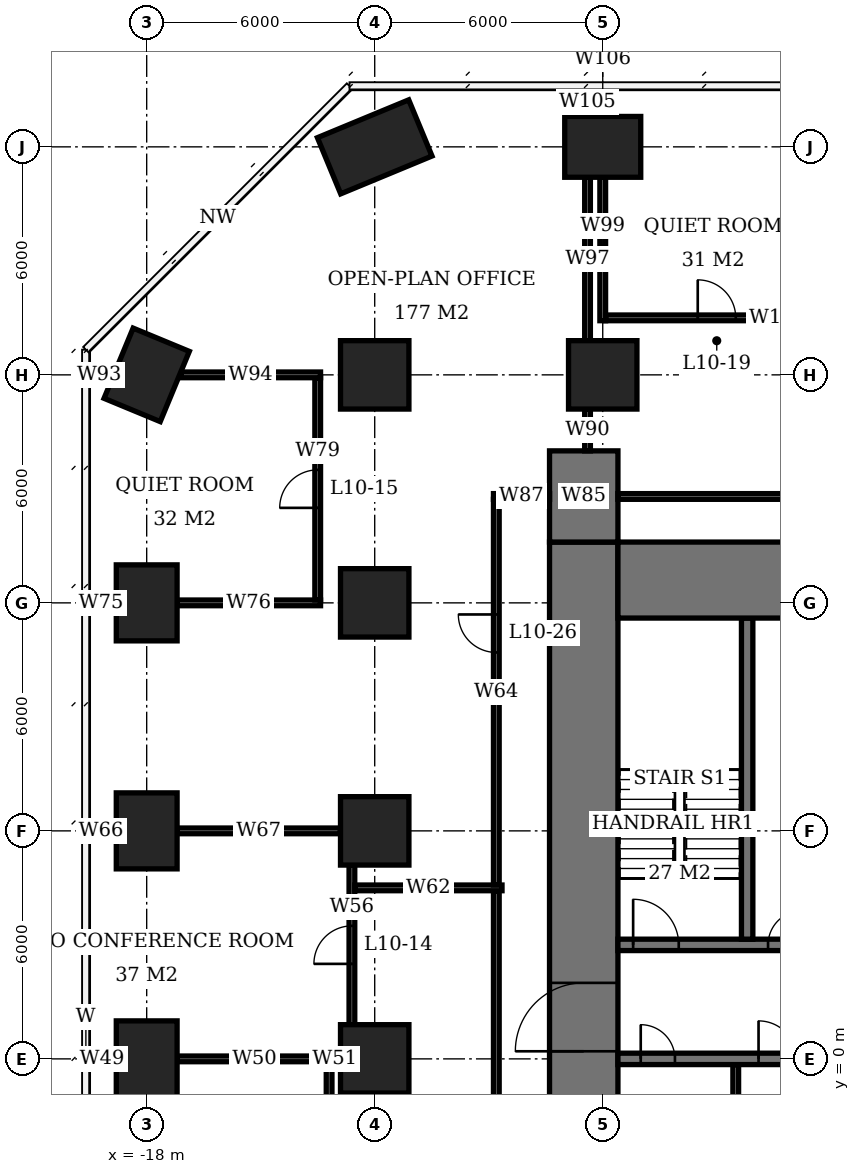
"""IFC4 building model, lengths in metres.
Left out: names, types, materials, properties, quantities, classifications, styles, units other than length and angle.
Written with IfcOpenShell. Run it as: python <this file> out.ifc"""

import sys

from ifc_helpers import new_model, si_unit, direction, frame, frame_2d, origin, origin_2d, place, context, subcontext, project, spatial, rectangle, extrude, element, fill, save


model = new_model("IFC4")
c1 = context("Model", 3, precision=1e-05, world=origin(), true_north=direction((0.0, 1.0)))
c2 = subcontext(c1, "Body", "Model", "MODEL_VIEW")
j1 = project(units=[si_unit("LENGTHUNIT", "METRE"), si_unit("PLANEANGLEUNIT", "RADIAN")], contexts=[c1])
p1 = place(None, origin())
s1 = spatial("IfcSite", under=j1, at=p1, CompositionType="ELEMENT")
p2 = place(p1, origin())
s2 = spatial("IfcBuilding", under=s1, at=p2, CompositionType="ELEMENT")
p3 = place(p2, frame((0.0, 0.0, 45.5)))
s3 = spatial("IfcBuildingStorey", under=s2, at=p3, CompositionType="ELEMENT", Elevation=45.5)
for number, where, z_axis, x_axis in (
    (1, (-18.0, 0.0, 0.0), (0.0, 0.0, 1.0), (0.0, 1.0, 0.0)),
    (2, (-18.0, 6.0, 0.0), (0.0, 0.0, 1.0), (0.0, 1.0, 0.0)),
    (3, (-18.0, 12.0, 0.0), (0.0, 0.0, 1.0), (0.0, 1.0, 0.0)),
    (4, (-18.0, 18.0, 0.0), (0.0, 0.0, 1.0), (0.383, 0.924, 0.0)),
):
    element("IfcColumn", number, at=place(p3, frame(where, z_axis=z_axis, x_axis=x_axis)), inside=s3, PredefinedType="COLUMN", context=c2, shape_type="SweptSolid", body=[
        extrude(rectangle(XDim=2.0, YDim=1.6, at=origin_2d()), origin(), (0.0, 0.0, 1.0), 3.9),
    ])
for number, where, z_axis, x_axis in (
    (5, (-12.0, 0.0, 0.0), (0.0, 0.0, 1.0), (1.0, 0.0, 0.0)),
    (6, (-12.0, 6.0, 0.0), (0.0, 0.0, 1.0), (1.0, 0.0, 0.0)),
    (7, (-12.0, 12.0, 0.0), (0.0, 0.0, 1.0), (1.0, 0.0, 0.0)),
    (8, (-12.0, 18.0, 0.0), (0.0, 0.0, 1.0), (1.0, 0.0, 0.0)),
):
    element("IfcColumn", number, at=place(p3, frame(where, z_axis=z_axis, x_axis=x_axis)), inside=s3, PredefinedType="COLUMN", context=c2, shape_type="SweptSolid", body=[
        extrude(rectangle(XDim=1.8, YDim=1.8, at=origin_2d()), origin(), (0.0, 0.0, 1.0), 3.9),
    ])
p4 = place(p3, frame((-12.0, 24.0, 0.0), z_axis=(0.0, 0.0, 1.0), x_axis=(0.923879532511, 0.382683432365, 0.0)))
e9 = element("IfcColumn", 9, at=p4, inside=s3, PredefinedType="COLUMN", context=c2, shape_type="SweptSolid", body=[
    extrude(rectangle(XDim=2.6, YDim=1.6, at=origin_2d()), origin(), (0.0, 0.0, 1.0), 3.9),
])
p5 = place(p3, frame((-6.0, 18.0, 0.0), z_axis=(0.0, 0.0, 1.0), x_axis=(1.0, 0.0, 0.0)))
e10 = element("IfcColumn", 10, at=p5, inside=s3, PredefinedType="COLUMN", context=c2, shape_type="SweptSolid", body=[
    extrude(rectangle(XDim=1.8, YDim=1.8, at=origin_2d()), origin(), (0.0, 0.0, 1.0), 3.9),
])
p6 = place(p3, frame((-6.0, 24.0, 0.0), z_axis=(0.0, 0.0, 1.0), x_axis=(1.0, 0.0, 0.0)))
e11 = element("IfcColumn", 11, at=p6, inside=s3, PredefinedType="COLUMN", context=c2, shape_type="SweptSolid", body=[
    extrude(rectangle(XDim=2.0, YDim=1.6, at=origin_2d()), origin(), (0.0, 0.0, 1.0), 3.9),
])
p7 = place(p3, frame((-5.6, 12.6, 0.0), z_axis=(0.0, 0.0, 1.0), x_axis=(1.0, 0.0, 0.0)))
e12 = element("IfcWall", 12, at=p7, inside=s3, PredefinedType="SHEAR", context=c2, shape_type="SweptSolid", body=[
    extrude(rectangle(XDim=23.2, YDim=2.0, at=frame_2d((11.6, 0.0))), origin(), (0.0, 0.0, 1.0), 3.9),
])
p8 = place(p3, frame((-6.5, -7.6, 0.0), z_axis=(0.0, 0.0, 1.0), x_axis=(0.0, 1.0, 0.0)))
e13 = element("IfcWall", 13, at=p8, inside=s3, PredefinedType="SHEAR", context=c2, shape_type="SweptSolid", body=[
    extrude(rectangle(XDim=21.2, YDim=1.8, at=frame_2d((10.6, 0.0))), origin(), (0.0, 0.0, 1.0), 3.9),
])
p9 = place(p8, frame((7.8, 0.0, 0.0)))
e14 = element("IfcOpeningElement", 14, at=p9, cuts=e13, PredefinedType="OPENING", context=c2, shape_type="SweptSolid", body=[
    extrude(rectangle(XDim=1.8, YDim=2.4, at=frame_2d((0.9, 1.2))), frame((0.0, 0.91, 0.0), z_axis=(0.0, -1.0, 0.0), x_axis=(1.0, 0.0, 0.0)), (0.0, 0.0, 1.0), 1.82),
])
p10 = place(p3, frame((-6.5, 13.6, 0.0), z_axis=(0.0, 0.0, 1.0), x_axis=(0.0, 1.0, 0.0)))
e15 = element("IfcWall", 15, at=p10, inside=s3, PredefinedType="SHEAR", context=c2, shape_type="SweptSolid", body=[
    extrude(rectangle(XDim=2.4, YDim=1.8, at=frame_2d((1.2, 0.0))), origin(), (0.0, 0.0, 1.0), 3.9),
])
p11 = place(p3, frame((-5.6, 0.0, 0.0), z_axis=(0.0, 0.0, 1.0), x_axis=(1.0, 0.0, 0.0)))
e16 = element("IfcWall", 16, at=p11, inside=s3, PredefinedType="SHEAR", context=c2, shape_type="SweptSolid", body=[
    extrude(rectangle(XDim=17.75, YDim=0.3, at=frame_2d((8.875, 0.0))), origin(), (0.0, 0.0, 1.0), 3.9),
])
p12 = place(p11, frame((0.6, 0.0, 0.0)))
e17 = element("IfcOpeningElement", 17, at=p12, cuts=e16, PredefinedType="OPENING", context=c2, shape_type="SweptSolid", body=[
    extrude(rectangle(XDim=0.9, YDim=2.1, at=frame_2d((0.45, 1.05))), frame((0.0, 0.16, 0.0), z_axis=(0.0, -1.0, 0.0), x_axis=(1.0, 0.0, 0.0)), (0.0, 0.0, 1.0), 0.32),
])
p13 = place(p11, frame((3.7, 0.0, 0.0)))
e18 = element("IfcOpeningElement", 18, at=p13, cuts=e16, PredefinedType="OPENING", context=c2, shape_type="SweptSolid", body=[
    extrude(rectangle(XDim=1.0, YDim=2.1, at=frame_2d((0.5, 1.05))), frame((0.0, 0.16, 0.0), z_axis=(0.0, -1.0, 0.0), x_axis=(1.0, 0.0, 0.0)), (0.0, 0.0, 1.0), 0.32),
])
p14 = place(p3, frame((-5.6, 3.0, 0.0), z_axis=(0.0, 0.0, 1.0), x_axis=(1.0, 0.0, 0.0)))
e19 = element("IfcWall", 19, at=p14, inside=s3, PredefinedType="SHEAR", context=c2, shape_type="SweptSolid", body=[
    extrude(rectangle(XDim=5.45, YDim=0.3, at=frame_2d((2.725, 0.0))), origin(), (0.0, 0.0, 1.0), 3.9),
])
p15 = place(p14, frame((0.4, 0.0, 0.0)))
e20 = element("IfcOpeningElement", 20, at=p15, cuts=e19, PredefinedType="OPENING", context=c2, shape_type="SweptSolid", body=[
    extrude(rectangle(XDim=1.2, YDim=2.1, at=frame_2d((0.6, 1.05))), frame((0.0, 0.16, 0.0), z_axis=(0.0, -1.0, 0.0), x_axis=(1.0, 0.0, 0.0)), (0.0, 0.0, 1.0), 0.32),
])
p16 = place(p14, frame((3.95, 0.0, 0.0)))
e21 = element("IfcOpeningElement", 21, at=p16, cuts=e19, PredefinedType="OPENING", context=c2, shape_type="SweptSolid", body=[
    extrude(rectangle(XDim=0.9, YDim=2.1, at=frame_2d((0.45, 1.05))), frame((0.0, 0.16, 0.0), z_axis=(0.0, -1.0, 0.0), x_axis=(1.0, 0.0, 0.0)), (0.0, 0.0, 1.0), 0.32),
])
p17 = place(p3, frame((-2.2, 3.15, 0.0), z_axis=(0.0, 0.0, 1.0), x_axis=(0.0, 1.0, 0.0)))
e22 = element("IfcWall", 22, at=p17, inside=s3, PredefinedType="SHEAR", context=c2, shape_type="SweptSolid", body=[
    extrude(rectangle(XDim=8.45, YDim=0.3, at=frame_2d((4.225, 0.0))), origin(), (0.0, 0.0, 1.0), 3.9),
])
p18 = place(p3, frame((-2.5, -5.6, 0.0), z_axis=(0.0, 0.0, 1.0), x_axis=(0.0, 1.0, 0.0)))
e23 = element("IfcWall", 23, at=p18, inside=s3, PredefinedType="PLUMBINGWALL", context=c2, shape_type="SweptSolid", body=[
    extrude(rectangle(XDim=5.45, YDim=0.15, at=frame_2d((2.725, 0.0))), origin(), (0.0, 0.0, 1.0), 3.65),
])
p19 = place(p3, frame((-19.55, 0.0, 0.0), z_axis=(0.0, 0.0, 1.0), x_axis=(1.0, 0.0, 0.0)))
e24 = element("IfcWall", 24, at=p19, inside=s3, PredefinedType="PARTITIONING", context=c2, shape_type="SweptSolid", body=[
    extrude(rectangle(XDim=0.75, YDim=0.15, at=frame_2d((0.375, 0.0))), origin(), (0.0, 0.0, 1.0), 3.65),
])
p20 = place(p3, frame((-17.2, 0.0, 0.0), z_axis=(0.0, 0.0, 1.0), x_axis=(1.0, 0.0, 0.0)))
e25 = element("IfcWall", 25, at=p20, inside=s3, PredefinedType="PARTITIONING", context=c2, shape_type="SweptSolid", body=[
    extrude(rectangle(XDim=4.075, YDim=0.15, at=frame_2d((2.038, 0.0))), origin(), (0.0, 0.0, 1.0), 3.65),
])
p21 = place(p3, frame((-13.2, 0.0, 0.0), z_axis=(0.0, 0.0, 1.0), x_axis=(1.0, 0.0, 0.0)))
e26 = element("IfcWall", 26, at=p21, inside=s3, PredefinedType="PARTITIONING", context=c2, shape_type="SweptSolid", body=[
    extrude(rectangle(XDim=0.3, YDim=0.15, at=frame_2d((0.15, 0.0))), origin(), (0.0, 0.0, 1.0), 3.65),
])
p22 = place(p3, frame((-19.6, 6.0, 0.0), z_axis=(0.0, 0.0, 1.0), x_axis=(1.0, 0.0, 0.0)))
e27 = element("IfcWall", 27, at=p22, inside=s3, PredefinedType="PARTITIONING", context=c2, shape_type="SweptSolid", body=[
    extrude(rectangle(XDim=0.8, YDim=0.15, at=frame_2d((0.4, 0.0))), origin(), (0.0, 0.0, 1.0), 3.65),
])
p23 = place(p3, frame((-17.2, 6.0, 0.0), z_axis=(0.0, 0.0, 1.0), x_axis=(1.0, 0.0, 0.0)))
e28 = element("IfcWall", 28, at=p23, inside=s3, PredefinedType="PARTITIONING", context=c2, shape_type="SweptSolid", body=[
    extrude(rectangle(XDim=4.3, YDim=0.15, at=frame_2d((2.15, 0.0))), origin(), (0.0, 0.0, 1.0), 3.65),
])
p24 = place(p3, frame((-19.6, 12.0, 0.0), z_axis=(0.0, 0.0, 1.0), x_axis=(1.0, 0.0, 0.0)))
e29 = element("IfcWall", 29, at=p24, inside=s3, PredefinedType="PARTITIONING", context=c2, shape_type="SweptSolid", body=[
    extrude(rectangle(XDim=0.8, YDim=0.15, at=frame_2d((0.4, 0.0))), origin(), (0.0, 0.0, 1.0), 3.65),
])
p25 = place(p3, frame((-17.2, 12.0, 0.0), z_axis=(0.0, 0.0, 1.0), x_axis=(1.0, 0.0, 0.0)))
e30 = element("IfcWall", 30, at=p25, inside=s3, PredefinedType="PARTITIONING", context=c2, shape_type="SweptSolid", body=[
    extrude(rectangle(XDim=3.775, YDim=0.15, at=frame_2d((1.887, 0.0))), origin(), (0.0, 0.0, 1.0), 3.65),
])
p26 = place(p3, frame((-19.6, 18.0, 0.0), z_axis=(0.0, 0.0, 1.0), x_axis=(1.0, 0.0, 0.0)))
e31 = element("IfcWall", 31, at=p26, inside=s3, PredefinedType="PARTITIONING", context=c2, shape_type="SweptSolid", body=[
    extrude(rectangle(XDim=0.703, YDim=0.15, at=frame_2d((0.352, 0.0))), origin(), (0.0, 0.0, 1.0), 3.65),
])
p27 = place(p3, frame((-17.103, 18.0, 0.0), z_axis=(0.0, 0.0, 1.0), x_axis=(1.0, 0.0, 0.0)))
e32 = element("IfcWall", 32, at=p27, inside=s3, PredefinedType="PARTITIONING", context=c2, shape_type="SweptSolid", body=[
    extrude(rectangle(XDim=3.678, YDim=0.15, at=frame_2d((1.839, 0.0))), origin(), (0.0, 0.0, 1.0), 3.65),
])
p28 = place(p3, frame((-5.925, 19.5, 0.0), z_axis=(0.0, 0.0, 1.0), x_axis=(1.0, 0.0, 0.0)))
e33 = element("IfcWall", 33, at=p28, inside=s3, PredefinedType="PARTITIONING", context=c2, shape_type="SweptSolid", body=[
    extrude(rectangle(XDim=5.85, YDim=0.15, at=frame_2d((2.925, 0.0))), origin(), (0.0, 0.0, 1.0), 3.65),
])
p29 = place(p28, frame((2.425, 0.0, 0.0)))
e34 = element("IfcOpeningElement", 34, at=p29, cuts=e33, PredefinedType="OPENING", context=c2, shape_type="SweptSolid", body=[
    extrude(rectangle(XDim=1.0, YDim=2.1, at=frame_2d((0.5, 1.05))), frame((0.0, 0.085, 0.0), z_axis=(0.0, -1.0, 0.0), x_axis=(1.0, 0.0, 0.0)), (0.0, 0.0, 1.0), 0.17),
])
p30 = place(p3, frame((-13.5, 12.075, 0.0), z_axis=(0.0, 0.0, 1.0), x_axis=(0.0, 1.0, 0.0)))
e35 = element("IfcWall", 35, at=p30, inside=s3, PredefinedType="PARTITIONING", context=c2, shape_type="SweptSolid", body=[
    extrude(rectangle(XDim=5.85, YDim=0.15, at=frame_2d((2.925, 0.0))), origin(), (0.0, 0.0, 1.0), 3.65),
])
p31 = place(p30, frame((2.425, 0.0, 0.0)))
e36 = element("IfcOpeningElement", 36, at=p31, cuts=e35, PredefinedType="OPENING", context=c2, shape_type="SweptSolid", body=[
    extrude(rectangle(XDim=1.0, YDim=2.1, at=frame_2d((0.5, 1.05))), frame((0.0, 0.085, 0.0), z_axis=(0.0, -1.0, 0.0), x_axis=(1.0, 0.0, 0.0)), (0.0, 0.0, 1.0), 0.17),
])
p32 = place(p3, frame((-13.2, -5.925, 0.0), z_axis=(0.0, 0.0, 1.0), x_axis=(0.0, 1.0, 0.0)))
e37 = element("IfcWall", 37, at=p32, inside=s3, PredefinedType="PARTITIONING", context=c2, shape_type="SweptSolid", body=[
    extrude(rectangle(XDim=5.85, YDim=0.15, at=frame_2d((2.925, 0.0))), origin(), (0.0, 0.0, 1.0), 3.65),
])
p33 = place(p32, frame((2.425, 0.0, 0.0)))
e38 = element("IfcOpeningElement", 38, at=p33, cuts=e37, PredefinedType="OPENING", context=c2, shape_type="SweptSolid", body=[
    extrude(rectangle(XDim=1.0, YDim=2.1, at=frame_2d((0.5, 1.05))), frame((0.0, 0.085, 0.0), z_axis=(0.0, -1.0, 0.0), x_axis=(1.0, 0.0, 0.0)), (0.0, 0.0, 1.0), 0.17),
])
p34 = place(p3, frame((-12.6, 0.9, 0.0), z_axis=(0.0, 0.0, 1.0), x_axis=(0.0, 1.0, 0.0)))
e39 = element("IfcWall", 39, at=p34, inside=s3, PredefinedType="PARTITIONING", context=c2, shape_type="SweptSolid", body=[
    extrude(rectangle(XDim=4.2, YDim=0.15, at=frame_2d((2.1, 0.0))), origin(), (0.0, 0.0, 1.0), 3.65),
])
p35 = place(p34, frame((1.6, 0.0, 0.0)))
e40 = element("IfcOpeningElement", 40, at=p35, cuts=e39, PredefinedType="OPENING", context=c2, shape_type="SweptSolid", body=[
    extrude(rectangle(XDim=1.0, YDim=2.1, at=frame_2d((0.5, 1.05))), frame((0.0, 0.085, 0.0), z_axis=(0.0, -1.0, 0.0), x_axis=(1.0, 0.0, 0.0)), (0.0, 0.0, 1.0), 0.17),
])
p36 = place(p3, frame((-6.0, 19.425, 0.0), z_axis=(0.0, 0.0, 1.0), x_axis=(0.0, 1.0, 0.0)))
e41 = element("IfcWall", 41, at=p36, inside=s3, PredefinedType="PARTITIONING", context=c2, shape_type="SweptSolid", body=[
    extrude(rectangle(XDim=3.775, YDim=0.15, at=frame_2d((1.887, 0.0))), origin(), (0.0, 0.0, 1.0), 3.65),
])
p37 = place(p3, frame((-6.0, 24.8, 0.0), z_axis=(0.0, 0.0, 1.0), x_axis=(0.0, 1.0, 0.0)))
e42 = element("IfcWall", 42, at=p37, inside=s3, PredefinedType="PARTITIONING", context=c2, shape_type="SweptSolid", body=[
    extrude(rectangle(XDim=0.8, YDim=0.15, at=frame_2d((0.4, 0.0))), origin(), (0.0, 0.0, 1.0), 3.65),
])
p38 = place(p3, frame((-12.525, 4.5, 0.0), z_axis=(0.0, 0.0, 1.0), x_axis=(1.0, 0.0, 0.0)))
e43 = element("IfcWall", 43, at=p38, inside=s3, PredefinedType="PARTITIONING", context=c2, shape_type="SweptSolid", body=[
    extrude(rectangle(XDim=3.875, YDim=0.15, at=frame_2d((1.938, 0.0))), origin(), (0.0, 0.0, 1.0), 3.65),
])
p39 = place(p3, frame((-8.8, -8.725, 0.0), z_axis=(0.0, 0.0, 1.0), x_axis=(0.0, 1.0, 0.0)))
e44 = element("IfcWall", 44, at=p39, inside=s3, PredefinedType="PARTITIONING", context=c2, shape_type="SweptSolid", body=[
    extrude(rectangle(XDim=13.15, YDim=0.15, at=frame_2d((6.575, 0.0))), origin(), (0.0, 0.0, 1.0), 3.65),
])
p40 = place(p39, frame((4.08, 0.0, 0.0)))
e45 = element("IfcOpeningElement", 45, at=p40, cuts=e44, PredefinedType="OPENING", context=c2, shape_type="SweptSolid", body=[
    extrude(rectangle(XDim=1.0, YDim=2.1, at=frame_2d((0.5, 1.05))), frame((0.0, 0.085, 0.0), z_axis=(0.0, -1.0, 0.0), x_axis=(1.0, 0.0, 0.0)), (0.0, 0.0, 1.0), 0.17),
])
p41 = place(p3, frame((-8.8, 4.575, 0.0), z_axis=(0.0, 0.0, 1.0), x_axis=(0.0, 1.0, 0.0)))
e46 = element("IfcWall", 46, at=p41, inside=s3, PredefinedType="PARTITIONING", context=c2, shape_type="SweptSolid", body=[
    extrude(rectangle(XDim=10.15, YDim=0.15, at=frame_2d((5.075, 0.0))), origin(), (0.0, 0.0, 1.0), 3.65),
])
p42 = place(p41, frame((6.12, 0.0, 0.0)))
e47 = element("IfcOpeningElement", 47, at=p42, cuts=e46, PredefinedType="OPENING", context=c2, shape_type="SweptSolid", body=[
    extrude(rectangle(XDim=1.0, YDim=2.1, at=frame_2d((0.5, 1.05))), frame((0.0, 0.085, 0.0), z_axis=(0.0, -1.0, 0.0), x_axis=(1.0, 0.0, 0.0)), (0.0, 0.0, 1.0), 0.17),
])
p43 = place(p3, frame((-8.875, 14.8, 0.0), z_axis=(0.0, 0.0, 1.0), x_axis=(1.0, 0.0, 0.0)))
e48 = element("IfcWall", 48, at=p43, inside=s3, PredefinedType="PARTITIONING", context=c2, shape_type="SweptSolid", body=[
    extrude(rectangle(XDim=1.475, YDim=0.15, at=frame_2d((0.738, 0.0))), origin(), (0.0, 0.0, 1.0), 3.65),
])
p44 = place(p3, frame((-6.4, 16.0, 0.0), z_axis=(0.0, 0.0, 1.0), x_axis=(0.0, 1.0, 0.0)))
e49 = element("IfcWall", 49, at=p44, inside=s3, PredefinedType="PARTITIONING", context=c2, shape_type="SweptSolid", body=[
    extrude(rectangle(XDim=1.1, YDim=0.15, at=frame_2d((0.55, 0.0))), origin(), (0.0, 0.0, 1.0), 3.65),
])
p45 = place(p3, frame((-6.4, 18.9, 0.0), z_axis=(0.0, 0.0, 1.0), x_axis=(0.0, 1.0, 0.0)))
e50 = element("IfcWall", 50, at=p45, inside=s3, PredefinedType="PARTITIONING", context=c2, shape_type="SweptSolid", body=[
    extrude(rectangle(XDim=4.3, YDim=0.15, at=frame_2d((2.15, 0.0))), origin(), (0.0, 0.0, 1.0), 3.65),
])
p46 = place(p3, frame((-6.4, 24.8, 0.0), z_axis=(0.0, 0.0, 1.0), x_axis=(0.0, 1.0, 0.0)))
e51 = element("IfcWall", 51, at=p46, inside=s3, PredefinedType="PARTITIONING", context=c2, shape_type="SweptSolid", body=[
    extrude(rectangle(XDim=0.75, YDim=0.15, at=frame_2d((0.375, 0.0))), origin(), (0.0, 0.0, 1.0), 3.65),
])
p47 = place(p3, frame((-5.6, 14.8, 0.0), z_axis=(0.0, 0.0, 1.0), x_axis=(1.0, 0.0, 0.0)))
e52 = element("IfcWall", 52, at=p47, inside=s3, PredefinedType="PARTITIONING", context=c2, shape_type="SweptSolid", body=[
    extrude(rectangle(XDim=23.2, YDim=0.15, at=frame_2d((11.6, 0.0))), origin(), (0.0, 0.0, 1.0), 3.65),
])
p48 = place(p47, frame((14.58, 0.0, 0.0)))
e53 = element("IfcOpeningElement", 53, at=p48, cuts=e52, PredefinedType="OPENING", context=c2, shape_type="SweptSolid", body=[
    extrude(rectangle(XDim=1.0, YDim=2.1, at=frame_2d((0.5, 1.05))), frame((0.0, 0.085, 0.0), z_axis=(0.0, -1.0, 0.0), x_axis=(1.0, 0.0, 0.0)), (0.0, 0.0, 1.0), 0.17),
])
p49 = place(p9, origin())
e54 = element("IfcDoor", 54, at=p49, inside=s3, OperationType="DOUBLE_DOOR_SINGLE_SWING", PredefinedType="DOOR", context=c2, shape_type="SweptSolid", body=[
    extrude(rectangle(XDim=1.8, YDim=2.4, at=frame_2d((0.9, 1.2))), frame((0.0, 0.025, 0.0), z_axis=(0.0, -1.0, 0.0), x_axis=(1.0, 0.0, 0.0)), (0.0, 0.0, 1.0), 0.05),
])
fill(e14, e54)
p50 = place(p15, origin())
e55 = element("IfcDoor", 55, at=p50, inside=s3, OperationType="SINGLE_SWING_LEFT", PredefinedType="DOOR", context=c2, shape_type="SweptSolid", body=[
    extrude(rectangle(XDim=1.2, YDim=2.1, at=frame_2d((0.6, 1.05))), frame((0.0, 0.025, 0.0), z_axis=(0.0, -1.0, 0.0), x_axis=(1.0, 0.0, 0.0)), (0.0, 0.0, 1.0), 0.05),
])
fill(e20, e55)
p51 = place(p16, origin())
e56 = element("IfcDoor", 56, at=p51, inside=s3, OperationType="SINGLE_SWING_RIGHT", PredefinedType="DOOR", context=c2, shape_type="SweptSolid", body=[
    extrude(rectangle(XDim=0.9, YDim=2.1, at=frame_2d((0.45, 1.05))), frame((0.0, 0.025, 0.0), z_axis=(0.0, -1.0, 0.0), x_axis=(1.0, 0.0, 0.0)), (0.0, 0.0, 1.0), 0.05),
])
fill(e21, e56)
p52 = place(p12, origin())
e57 = element("IfcDoor", 57, at=p52, inside=s3, OperationType="SINGLE_SWING_LEFT", PredefinedType="DOOR", context=c2, shape_type="SweptSolid", body=[
    extrude(rectangle(XDim=0.9, YDim=2.1, at=frame_2d((0.45, 1.05))), frame((0.0, 0.025, 0.0), z_axis=(0.0, -1.0, 0.0), x_axis=(1.0, 0.0, 0.0)), (0.0, 0.0, 1.0), 0.05),
])
fill(e17, e57)
p53 = place(p13, origin())
e58 = element("IfcDoor", 58, at=p53, inside=s3, OperationType="SINGLE_SWING_LEFT", PredefinedType="DOOR", context=c2, shape_type="SweptSolid", body=[
    extrude(rectangle(XDim=1.0, YDim=2.1, at=frame_2d((0.5, 1.05))), frame((0.0, 0.025, 0.0), z_axis=(0.0, -1.0, 0.0), x_axis=(1.0, 0.0, 0.0)), (0.0, 0.0, 1.0), 0.05),
])
fill(e18, e58)
p54 = place(p35, origin())
e59 = element("IfcDoor", 59, at=p54, inside=s3, OperationType="SINGLE_SWING_LEFT", PredefinedType="DOOR", context=c2, shape_type="SweptSolid", body=[
    extrude(rectangle(XDim=1.0, YDim=2.1, at=frame_2d((0.5, 1.05))), frame((0.0, 0.025, 0.0), z_axis=(0.0, -1.0, 0.0), x_axis=(1.0, 0.0, 0.0)), (0.0, 0.0, 1.0), 0.05),
])
fill(e40, e59)
p55 = place(p31, origin())
e60 = element("IfcDoor", 60, at=p55, inside=s3, OperationType="SINGLE_SWING_LEFT", PredefinedType="DOOR", context=c2, shape_type="SweptSolid", body=[
    extrude(rectangle(XDim=1.0, YDim=2.1, at=frame_2d((0.5, 1.05))), frame((0.0, 0.025, 0.0), z_axis=(0.0, -1.0, 0.0), x_axis=(1.0, 0.0, 0.0)), (0.0, 0.0, 1.0), 0.05),
])
fill(e36, e60)
p56 = place(p29, origin())
e61 = element("IfcDoor", 61, at=p56, inside=s3, OperationType="SINGLE_SWING_LEFT", PredefinedType="DOOR", context=c2, shape_type="SweptSolid", body=[
    extrude(rectangle(XDim=1.0, YDim=2.1, at=frame_2d((0.5, 1.05))), frame((0.0, 0.025, 0.0), z_axis=(0.0, -1.0, 0.0), x_axis=(1.0, 0.0, 0.0)), (0.0, 0.0, 1.0), 0.05),
])
fill(e34, e61)
p57 = place(p42, origin())
e62 = element("IfcDoor", 62, at=p57, inside=s3, OperationType="SINGLE_SWING_RIGHT", PredefinedType="DOOR", context=c2, shape_type="SweptSolid", body=[
    extrude(rectangle(XDim=1.0, YDim=2.1, at=frame_2d((0.5, 1.05))), frame((0.0, 0.025, 0.0), z_axis=(0.0, -1.0, 0.0), x_axis=(1.0, 0.0, 0.0)), (0.0, 0.0, 1.0), 0.05),
])
fill(e47, e62)
save(model, sys.argv[1])
